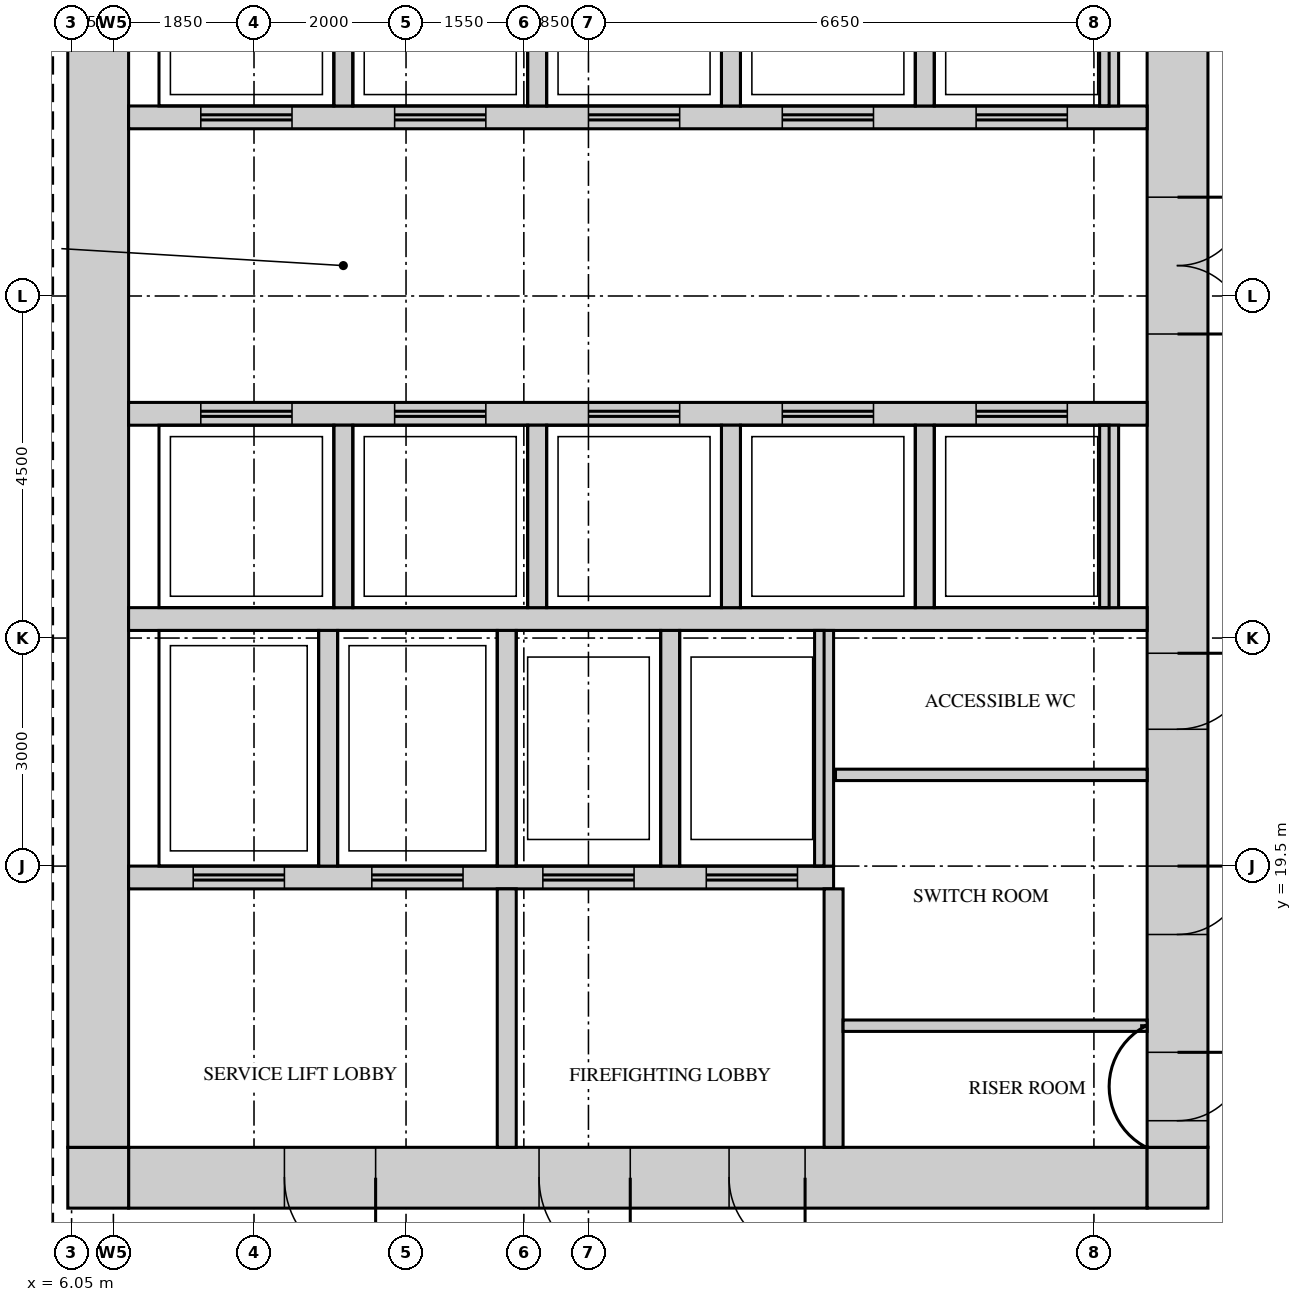
"""IFC4 building model, lengths in metres.
Left out: names, types, materials, properties, quantities, classifications, styles, units other than length and angle.
Written with IfcOpenShell. Run it as: python <this file> out.ifc"""

import sys

from ifc_helpers import new_model, si_unit, direction, frame, frame_2d, origin, place, context, subcontext, project, spatial, rectangle, extrude, source, transform, mapped, element, fill, save


model = new_model("IFC4")
c1 = context("Model", 3, precision=1e-05, world=origin(), true_north=direction((0.0, 1.0)))
c2 = subcontext(c1, "Body", "Model", "MODEL_VIEW")
j1 = project(units=[si_unit("LENGTHUNIT", "METRE"), si_unit("PLANEANGLEUNIT", "RADIAN")], contexts=[c1])
p1 = place(None, origin())
s1 = spatial("IfcSite", under=j1, at=p1, CompositionType="ELEMENT")
p2 = place(p1, origin())
s2 = spatial("IfcBuilding", under=s1, at=p2, CompositionType="ELEMENT")
p3 = place(p2, frame((0.0, 0.0, 200.7)))
s3 = spatial("IfcBuildingStorey", under=s2, at=p3, CompositionType="ELEMENT", Elevation=200.7)
m1 = source(origin(), c2, "Body", "SweptSolid", [
    extrude(rectangle(XDim=13.4, YDim=0.8, at=frame_2d((6.7, 0.0))), origin(), (0.0, 0.0, 1.0), 3.75),
])
p4 = place(p3, frame((6.8, 15.4, 0.0), z_axis=(0.0, 0.0, 1.0), x_axis=(1.0, 0.0, 0.0)))
e1 = element("IfcWall", 1, at=p4, inside=s3, PredefinedType="SHEAR", context=c2, shape_type="MappedRepresentation", body=[
    mapped(m1, transform((0.0, 0.0, 0.0))),
])
m2 = source(origin(), c2, "Body", "SweptSolid", [
    extrude(rectangle(XDim=1.2, YDim=2.1, at=frame_2d((0.6, 1.05))), frame((0.0, 0.41, 0.0), z_axis=(0.0, -1.0, 0.0), x_axis=(1.0, 0.0, 0.0)), (0.0, 0.0, 1.0), 0.82),
])
p5 = place(p4, frame((5.4, 0.0, 0.0)))
e2 = element("IfcOpeningElement", 2, at=p5, cuts=e1, PredefinedType="OPENING", context=c2, shape_type="MappedRepresentation", body=[
    mapped(m2, transform((0.0, 0.0, 0.0))),
])
p6 = place(p4, frame((2.05, 0.0, 0.0)))
e3 = element("IfcOpeningElement", 3, at=p6, cuts=e1, PredefinedType="OPENING", context=c2, shape_type="MappedRepresentation", body=[
    mapped(m2, transform((0.0, 0.0, 0.0))),
])
m3 = source(origin(), c2, "Body", "SweptSolid", [
    extrude(rectangle(XDim=1.0, YDim=2.1, at=frame_2d((0.5, 1.05))), frame((0.0, 0.41, 0.0), z_axis=(0.0, -1.0, 0.0), x_axis=(1.0, 0.0, 0.0)), (0.0, 0.0, 1.0), 0.82),
])
p7 = place(p4, frame((7.9, 0.0, 0.0)))
e4 = element("IfcOpeningElement", 4, at=p7, cuts=e1, PredefinedType="OPENING", context=c2, shape_type="MappedRepresentation", body=[
    mapped(m3, transform((0.0, 0.0, 0.0))),
])
m4 = source(origin(), c2, "Body", "SweptSolid", [
    extrude(rectangle(XDim=0.8, YDim=0.8, at=frame_2d((0.4, 0.0))), origin(), (0.0, 0.0, 1.0), 3.75),
])
for number, where, z_axis, x_axis in (
    (5, (20.2, 15.4, 0.0), (0.0, 0.0, 1.0), (1.0, 0.0, 0.0)),
    (6, (6.0, 15.4, 0.0), (0.0, 0.0, 1.0), (1.0, 0.0, 0.0)),
):
    element("IfcWall", number, at=place(p3, frame(where, z_axis=z_axis, x_axis=x_axis)), inside=s3, PredefinedType="SHEAR", context=c2, shape_type="MappedRepresentation", body=[
        mapped(m4, transform((0.0, 0.0, 0.0))),
    ])
m5 = source(origin(), c2, "Body", "SweptSolid", [
    extrude(rectangle(XDim=22.4, YDim=0.8, at=frame_2d((11.2, 0.0))), origin(), (0.0, 0.0, 1.0), 3.75),
])
p8 = place(p3, frame((20.6, 15.8, 0.0), z_axis=(0.0, 0.0, 1.0), x_axis=(0.0, 1.0, 0.0)))
e7 = element("IfcWall", 7, at=p8, inside=s3, PredefinedType="SHEAR", context=c2, shape_type="MappedRepresentation", body=[
    mapped(m5, transform((0.0, 0.0, 0.0))),
])
m6 = source(origin(), c2, "Body", "SweptSolid", [
    extrude(rectangle(XDim=1.8, YDim=2.1, at=frame_2d((0.9, 1.05))), frame((0.0, 0.41, 0.0), z_axis=(0.0, -1.0, 0.0), x_axis=(1.0, 0.0, 0.0)), (0.0, 0.0, 1.0), 0.82),
])
p9 = place(p8, frame((10.7, 0.0, 0.0)))
e8 = element("IfcOpeningElement", 8, at=p9, cuts=e7, PredefinedType="OPENING", context=c2, shape_type="MappedRepresentation", body=[
    mapped(m6, transform((0.0, 0.0, 0.0))),
])
m7 = source(origin(), c2, "Body", "SweptSolid", [
    extrude(rectangle(XDim=0.9, YDim=2.1, at=frame_2d((0.45, 1.05))), frame((0.0, 0.41, 0.0), z_axis=(0.0, -1.0, 0.0), x_axis=(1.0, 0.0, 0.0)), (0.0, 0.0, 1.0), 0.82),
])
p10 = place(p8, frame((0.35, 0.0, 0.0)))
e9 = element("IfcOpeningElement", 9, at=p10, cuts=e7, PredefinedType="OPENING", context=c2, shape_type="MappedRepresentation", body=[
    mapped(m7, transform((0.0, 0.0, 0.0))),
])
p11 = place(p8, frame((2.8, 0.0, 0.0)))
e10 = element("IfcOpeningElement", 10, at=p11, cuts=e7, PredefinedType="OPENING", context=c2, shape_type="MappedRepresentation", body=[
    mapped(m7, transform((0.0, 0.0, 0.0))),
])
p12 = place(p8, frame((5.5, 0.0, 0.0)))
e11 = element("IfcOpeningElement", 11, at=p12, cuts=e7, PredefinedType="OPENING", context=c2, shape_type="MappedRepresentation", body=[
    mapped(m3, transform((0.0, 0.0, 0.0))),
])
p13 = place(p3, frame((6.4, 15.8, 0.0), z_axis=(0.0, 0.0, 1.0), x_axis=(0.0, 1.0, 0.0)))
e12 = element("IfcWall", 12, at=p13, inside=s3, PredefinedType="SHEAR", context=c2, shape_type="MappedRepresentation", body=[
    mapped(m5, transform((0.0, 0.0, 0.0))),
])
m8 = source(origin(), c2, "Body", "SweptSolid", [
    extrude(rectangle(XDim=13.4, YDim=0.3, at=frame_2d((6.7, 0.0))), origin(), (0.0, 0.0, 1.0), 3.75),
])
p14 = place(p3, frame((6.8, 22.75, 0.0), z_axis=(0.0, 0.0, 1.0), x_axis=(1.0, 0.0, 0.0)))
e13 = element("IfcWall", 13, at=p14, inside=s3, PredefinedType="STANDARD", context=c2, shape_type="MappedRepresentation", body=[
    mapped(m8, transform((0.0, 0.0, 0.0))),
])
m9 = source(origin(), c2, "Body", "SweptSolid", [
    extrude(rectangle(XDim=9.275, YDim=0.3, at=frame_2d((4.637, 0.0))), origin(), (0.0, 0.0, 1.0), 3.75),
])
p15 = place(p3, frame((6.8, 19.35, 0.0), z_axis=(0.0, 0.0, 1.0), x_axis=(1.0, 0.0, 0.0)))
e14 = element("IfcWall", 14, at=p15, inside=s3, PredefinedType="STANDARD", context=c2, shape_type="MappedRepresentation", body=[
    mapped(m9, transform((0.0, 0.0, 0.0))),
])
m10 = source(origin(), c2, "Body", "SweptSolid", [
    extrude(rectangle(XDim=1.2, YDim=2.1, at=frame_2d((0.6, 1.05))), frame((0.0, 0.16, 0.0), z_axis=(0.0, -1.0, 0.0), x_axis=(1.0, 0.0, 0.0)), (0.0, 0.0, 1.0), 0.32),
])
p16 = place(p15, frame((0.85, 0.0, 0.0)))
e15 = element("IfcOpeningElement", 15, at=p16, cuts=e14, PredefinedType="OPENING", context=c2, shape_type="MappedRepresentation", body=[
    mapped(m10, transform((0.0, 0.0, 0.0))),
])
p17 = place(p15, frame((3.2, 0.0, 0.0)))
e16 = element("IfcOpeningElement", 16, at=p17, cuts=e14, PredefinedType="OPENING", context=c2, shape_type="MappedRepresentation", body=[
    mapped(m10, transform((0.0, 0.0, 0.0))),
])
p18 = place(p15, frame((5.45, 0.0, 0.0)))
e17 = element("IfcOpeningElement", 17, at=p18, cuts=e14, PredefinedType="OPENING", context=c2, shape_type="MappedRepresentation", body=[
    mapped(m10, transform((0.0, 0.0, 0.0))),
])
p19 = place(p15, frame((7.6, 0.0, 0.0)))
e18 = element("IfcOpeningElement", 18, at=p19, cuts=e14, PredefinedType="OPENING", context=c2, shape_type="MappedRepresentation", body=[
    mapped(m10, transform((0.0, 0.0, 0.0))),
])
p20 = place(p3, frame((6.8, 29.35, 0.0), z_axis=(0.0, 0.0, 1.0), x_axis=(1.0, 0.0, 0.0)))
e19 = element("IfcWall", 19, at=p20, inside=s3, PredefinedType="STANDARD", context=c2, shape_type="MappedRepresentation", body=[
    mapped(m8, transform((0.0, 0.0, 0.0))),
])
p21 = place(p20, frame((0.95, 0.0, 0.0)))
e20 = element("IfcOpeningElement", 20, at=p21, cuts=e19, PredefinedType="OPENING", context=c2, shape_type="MappedRepresentation", body=[
    mapped(m10, transform((0.0, 0.0, 0.0))),
])
p22 = place(p20, frame((3.5, 0.0, 0.0)))
e21 = element("IfcOpeningElement", 21, at=p22, cuts=e19, PredefinedType="OPENING", context=c2, shape_type="MappedRepresentation", body=[
    mapped(m10, transform((0.0, 0.0, 0.0))),
])
p23 = place(p20, frame((6.05, 0.0, 0.0)))
e22 = element("IfcOpeningElement", 22, at=p23, cuts=e19, PredefinedType="OPENING", context=c2, shape_type="MappedRepresentation", body=[
    mapped(m10, transform((0.0, 0.0, 0.0))),
])
p24 = place(p20, frame((8.6, 0.0, 0.0)))
e23 = element("IfcOpeningElement", 23, at=p24, cuts=e19, PredefinedType="OPENING", context=c2, shape_type="MappedRepresentation", body=[
    mapped(m10, transform((0.0, 0.0, 0.0))),
])
p25 = place(p20, frame((11.15, 0.0, 0.0)))
e24 = element("IfcOpeningElement", 24, at=p25, cuts=e19, PredefinedType="OPENING", context=c2, shape_type="MappedRepresentation", body=[
    mapped(m10, transform((0.0, 0.0, 0.0))),
])
p26 = place(p3, frame((6.8, 25.45, 0.0), z_axis=(0.0, 0.0, 1.0), x_axis=(1.0, 0.0, 0.0)))
e25 = element("IfcWall", 25, at=p26, inside=s3, PredefinedType="STANDARD", context=c2, shape_type="MappedRepresentation", body=[
    mapped(m8, transform((0.0, 0.0, 0.0))),
])
p27 = place(p26, frame((0.95, 0.0, 0.0)))
e26 = element("IfcOpeningElement", 26, at=p27, cuts=e25, PredefinedType="OPENING", context=c2, shape_type="MappedRepresentation", body=[
    mapped(m10, transform((0.0, 0.0, 0.0))),
])
p28 = place(p26, frame((3.5, 0.0, 0.0)))
e27 = element("IfcOpeningElement", 27, at=p28, cuts=e25, PredefinedType="OPENING", context=c2, shape_type="MappedRepresentation", body=[
    mapped(m10, transform((0.0, 0.0, 0.0))),
])
p29 = place(p26, frame((6.05, 0.0, 0.0)))
e28 = element("IfcOpeningElement", 28, at=p29, cuts=e25, PredefinedType="OPENING", context=c2, shape_type="MappedRepresentation", body=[
    mapped(m10, transform((0.0, 0.0, 0.0))),
])
p30 = place(p26, frame((8.6, 0.0, 0.0)))
e29 = element("IfcOpeningElement", 29, at=p30, cuts=e25, PredefinedType="OPENING", context=c2, shape_type="MappedRepresentation", body=[
    mapped(m10, transform((0.0, 0.0, 0.0))),
])
p31 = place(p26, frame((11.15, 0.0, 0.0)))
e30 = element("IfcOpeningElement", 30, at=p31, cuts=e25, PredefinedType="OPENING", context=c2, shape_type="MappedRepresentation", body=[
    mapped(m10, transform((0.0, 0.0, 0.0))),
])
m11 = source(origin(), c2, "Body", "SweptSolid", [
    extrude(rectangle(XDim=3.1, YDim=0.25, at=frame_2d((1.55, 0.0))), origin(), (0.0, 0.0, 1.0), 3.75),
])
for number, where, z_axis, x_axis in (
    (31, (9.425, 19.5, 0.0), (0.0, 0.0, 1.0), (0.0, 1.0, 0.0)),
    (32, (11.775, 19.5, 0.0), (0.0, 0.0, 1.0), (0.0, 1.0, 0.0)),
    (33, (13.925, 19.5, 0.0), (0.0, 0.0, 1.0), (0.0, 1.0, 0.0)),
    (34, (15.95, 19.5, 0.0), (0.0, 0.0, 1.0), (0.0, 1.0, 0.0)),
):
    element("IfcWall", number, at=place(p3, frame(where, z_axis=z_axis, x_axis=x_axis)), inside=s3, PredefinedType="STANDARD", context=c2, shape_type="MappedRepresentation", body=[
        mapped(m11, transform((0.0, 0.0, 0.0))),
    ])
m12 = source(origin(), c2, "Body", "SweptSolid", [
    extrude(rectangle(XDim=2.4, YDim=0.25, at=frame_2d((1.2, 0.0))), origin(), (0.0, 0.0, 1.0), 3.75),
])
for number, where, z_axis, x_axis in (
    (35, (17.275, 29.5, 0.0), (0.0, 0.0, 1.0), (0.0, 1.0, 0.0)),
    (36, (19.7, 29.5, 0.0), (0.0, 0.0, 1.0), (0.0, 1.0, 0.0)),
    (37, (9.625, 29.5, 0.0), (0.0, 0.0, 1.0), (0.0, 1.0, 0.0)),
    (38, (12.175, 29.5, 0.0), (0.0, 0.0, 1.0), (0.0, 1.0, 0.0)),
    (39, (14.725, 29.5, 0.0), (0.0, 0.0, 1.0), (0.0, 1.0, 0.0)),
):
    element("IfcWall", number, at=place(p3, frame(where, z_axis=z_axis, x_axis=x_axis)), inside=s3, PredefinedType="STANDARD", context=c2, shape_type="MappedRepresentation", body=[
        mapped(m12, transform((0.0, 0.0, 0.0))),
    ])
m13 = source(origin(), c2, "Body", "SweptSolid", [
    extrude(rectangle(XDim=2.4, YDim=0.25, at=frame_2d((1.2, 0.0))), origin(), (0.0, 0.0, 1.0), 3.75),
])
for number, where, z_axis, x_axis in (
    (40, (17.275, 22.9, 0.0), (0.0, 0.0, 1.0), (0.0, 1.0, 0.0)),
    (41, (19.7, 22.9, 0.0), (0.0, 0.0, 1.0), (0.0, 1.0, 0.0)),
    (42, (9.625, 22.9, 0.0), (0.0, 0.0, 1.0), (0.0, 1.0, 0.0)),
    (43, (12.175, 22.9, 0.0), (0.0, 0.0, 1.0), (0.0, 1.0, 0.0)),
    (44, (14.725, 22.9, 0.0), (0.0, 0.0, 1.0), (0.0, 1.0, 0.0)),
):
    element("IfcWall", number, at=place(p3, frame(where, z_axis=z_axis, x_axis=x_axis)), inside=s3, PredefinedType="STANDARD", context=c2, shape_type="MappedRepresentation", body=[
        mapped(m13, transform((0.0, 0.0, 0.0))),
    ])
m14 = source(origin(), c2, "Body", "SweptSolid", [
    extrude(rectangle(XDim=3.4, YDim=0.25, at=frame_2d((1.7, 0.0))), origin(), (0.0, 0.0, 1.0), 3.75),
])
for number, where, z_axis, x_axis in (
    (45, (16.075, 15.8, 0.0), (0.0, 0.0, 1.0), (0.0, 1.0, 0.0)),
    (46, (11.775, 15.8, 0.0), (0.0, 0.0, 1.0), (0.0, 1.0, 0.0)),
):
    element("IfcWall", number, at=place(p3, frame(where, z_axis=z_axis, x_axis=x_axis)), inside=s3, PredefinedType="STANDARD", context=c2, shape_type="MappedRepresentation", body=[
        mapped(m14, transform((0.0, 0.0, 0.0))),
    ])
m15 = source(origin(), c2, "Body", "SweptSolid", [
    extrude(rectangle(XDim=4.0, YDim=0.15, at=frame_2d((2.0, 0.0))), origin(), (0.0, 0.0, 1.0), 3.8),
])
p32 = place(p3, frame((16.2, 17.4, 0.0), z_axis=(0.0, 0.0, 1.0), x_axis=(1.0, 0.0, 0.0)))
e47 = element("IfcWall", 47, at=p32, inside=s3, PredefinedType="PARTITIONING", context=c2, shape_type="MappedRepresentation", body=[
    mapped(m15, transform((0.0, 0.0, 0.0))),
])
m16 = source(origin(), c2, "Body", "SweptSolid", [
    extrude(rectangle(XDim=4.1, YDim=0.15, at=frame_2d((2.05, 0.0))), origin(), (0.0, 0.0, 1.0), 3.8),
])
p33 = place(p3, frame((16.1, 20.7, 0.0), z_axis=(0.0, 0.0, 1.0), x_axis=(1.0, 0.0, 0.0)))
e48 = element("IfcWall", 48, at=p33, inside=s3, PredefinedType="PARTITIONING", context=c2, shape_type="MappedRepresentation", body=[
    mapped(m16, transform((0.0, 0.0, 0.0))),
])
m17 = source(origin(), c2, "Body", "SweptSolid", [
    extrude(rectangle(XDim=1.8, YDim=2.1, at=frame_2d((0.9, 1.05))), frame((0.0, 0.35, 0.0), z_axis=(0.0, -1.0, 0.0), x_axis=(1.0, 0.0, 0.0)), (0.0, 0.0, 1.0), 0.7),
])
p34 = place(p9, origin())
e49 = element("IfcDoor", 49, at=p34, inside=s3, OperationType="DOUBLE_DOOR_SINGLE_SWING", PredefinedType="DOOR", context=c2, shape_type="MappedRepresentation", body=[
    mapped(m17, transform((0.0, 0.0, 0.0))),
])
fill(e8, e49)
m18 = source(origin(), c2, "Body", "SweptSolid", [
    extrude(rectangle(XDim=0.9, YDim=2.1, at=frame_2d((0.45, 1.05))), frame((0.0, 0.35, 0.0), z_axis=(0.0, -1.0, 0.0), x_axis=(1.0, 0.0, 0.0)), (0.0, 0.0, 1.0), 0.7),
])
p35 = place(p10, origin())
e50 = element("IfcDoor", 50, at=p35, inside=s3, OperationType="SINGLE_SWING_RIGHT", PredefinedType="DOOR", context=c2, shape_type="MappedRepresentation", body=[
    mapped(m18, transform((0.0, 0.0, 0.0))),
])
fill(e9, e50)
p36 = place(p11, origin())
e51 = element("IfcDoor", 51, at=p36, inside=s3, OperationType="SINGLE_SWING_RIGHT", PredefinedType="DOOR", context=c2, shape_type="MappedRepresentation", body=[
    mapped(m18, transform((0.0, 0.0, 0.0))),
])
fill(e10, e51)
m19 = source(origin(), c2, "Body", "SweptSolid", [
    extrude(rectangle(XDim=1.0, YDim=2.1, at=frame_2d((0.5, 1.05))), frame((0.0, 0.35, 0.0), z_axis=(0.0, -1.0, 0.0), x_axis=(1.0, 0.0, 0.0)), (0.0, 0.0, 1.0), 0.7),
])
p37 = place(p12, origin())
e52 = element("IfcDoor", 52, at=p37, inside=s3, OperationType="SINGLE_SWING_RIGHT", PredefinedType="DOOR", context=c2, shape_type="MappedRepresentation", body=[
    mapped(m19, transform((0.0, 0.0, 0.0))),
])
fill(e11, e52)
m20 = source(origin(), c2, "Body", "SweptSolid", [
    extrude(rectangle(XDim=1.2, YDim=2.1, at=frame_2d((0.6, 1.05))), frame((0.0, 0.35, 0.0), z_axis=(0.0, -1.0, 0.0), x_axis=(1.0, 0.0, 0.0)), (0.0, 0.0, 1.0), 0.7),
])
p38 = place(p5, origin())
e53 = element("IfcDoor", 53, at=p38, inside=s3, OperationType="SINGLE_SWING_RIGHT", PredefinedType="DOOR", context=c2, shape_type="MappedRepresentation", body=[
    mapped(m20, transform((0.0, 0.0, 0.0))),
])
fill(e2, e53)
p39 = place(p6, origin())
e54 = element("IfcDoor", 54, at=p39, inside=s3, OperationType="SINGLE_SWING_RIGHT", PredefinedType="DOOR", context=c2, shape_type="MappedRepresentation", body=[
    mapped(m20, transform((0.0, 0.0, 0.0))),
])
fill(e3, e54)
p40 = place(p7, origin())
e55 = element("IfcDoor", 55, at=p40, inside=s3, OperationType="SINGLE_SWING_RIGHT", PredefinedType="DOOR", context=c2, shape_type="MappedRepresentation", body=[
    mapped(m19, transform((0.0, 0.0, 0.0))),
])
fill(e4, e55)
m21 = source(origin(), c2, "Body", "SweptSolid", [
    extrude(rectangle(XDim=1.2, YDim=2.1, at=frame_2d((0.6, 1.05))), frame((0.0, 0.025, 0.0), z_axis=(0.0, -1.0, 0.0), x_axis=(1.0, 0.0, 0.0)), (0.0, 0.0, 1.0), 0.05),
])
p41 = place(p27, origin())
e56 = element("IfcDoor", 56, at=p41, inside=s3, OperationType="DOUBLE_DOOR_SLIDING", PredefinedType="DOOR", context=c2, shape_type="MappedRepresentation", body=[
    mapped(m21, transform((0.0, 0.0, 0.0))),
])
fill(e26, e56)
p42 = place(p28, origin())
e57 = element("IfcDoor", 57, at=p42, inside=s3, OperationType="DOUBLE_DOOR_SLIDING", PredefinedType="DOOR", context=c2, shape_type="MappedRepresentation", body=[
    mapped(m21, transform((0.0, 0.0, 0.0))),
])
fill(e27, e57)
p43 = place(p29, origin())
e58 = element("IfcDoor", 58, at=p43, inside=s3, OperationType="DOUBLE_DOOR_SLIDING", PredefinedType="DOOR", context=c2, shape_type="MappedRepresentation", body=[
    mapped(m21, transform((0.0, 0.0, 0.0))),
])
fill(e28, e58)
p44 = place(p30, origin())
e59 = element("IfcDoor", 59, at=p44, inside=s3, OperationType="DOUBLE_DOOR_SLIDING", PredefinedType="DOOR", context=c2, shape_type="MappedRepresentation", body=[
    mapped(m21, transform((0.0, 0.0, 0.0))),
])
fill(e29, e59)
p45 = place(p31, origin())
e60 = element("IfcDoor", 60, at=p45, inside=s3, OperationType="DOUBLE_DOOR_SLIDING", PredefinedType="DOOR", context=c2, shape_type="MappedRepresentation", body=[
    mapped(m21, transform((0.0, 0.0, 0.0))),
])
fill(e30, e60)
p46 = place(p21, origin())
e61 = element("IfcDoor", 61, at=p46, inside=s3, OperationType="DOUBLE_DOOR_SLIDING", PredefinedType="DOOR", context=c2, shape_type="MappedRepresentation", body=[
    mapped(m21, transform((0.0, 0.0, 0.0))),
])
fill(e20, e61)
p47 = place(p22, origin())
e62 = element("IfcDoor", 62, at=p47, inside=s3, OperationType="DOUBLE_DOOR_SLIDING", PredefinedType="DOOR", context=c2, shape_type="MappedRepresentation", body=[
    mapped(m21, transform((0.0, 0.0, 0.0))),
])
fill(e21, e62)
p48 = place(p23, origin())
e63 = element("IfcDoor", 63, at=p48, inside=s3, OperationType="DOUBLE_DOOR_SLIDING", PredefinedType="DOOR", context=c2, shape_type="MappedRepresentation", body=[
    mapped(m21, transform((0.0, 0.0, 0.0))),
])
fill(e22, e63)
p49 = place(p24, origin())
e64 = element("IfcDoor", 64, at=p49, inside=s3, OperationType="DOUBLE_DOOR_SLIDING", PredefinedType="DOOR", context=c2, shape_type="MappedRepresentation", body=[
    mapped(m21, transform((0.0, 0.0, 0.0))),
])
fill(e23, e64)
p50 = place(p25, origin())
e65 = element("IfcDoor", 65, at=p50, inside=s3, OperationType="DOUBLE_DOOR_SLIDING", PredefinedType="DOOR", context=c2, shape_type="MappedRepresentation", body=[
    mapped(m21, transform((0.0, 0.0, 0.0))),
])
fill(e24, e65)
p51 = place(p16, origin())
e66 = element("IfcDoor", 66, at=p51, inside=s3, OperationType="DOUBLE_DOOR_SLIDING", PredefinedType="DOOR", context=c2, shape_type="MappedRepresentation", body=[
    mapped(m21, transform((0.0, 0.0, 0.0))),
])
fill(e15, e66)
p52 = place(p17, origin())
e67 = element("IfcDoor", 67, at=p52, inside=s3, OperationType="DOUBLE_DOOR_SLIDING", PredefinedType="DOOR", context=c2, shape_type="MappedRepresentation", body=[
    mapped(m21, transform((0.0, 0.0, 0.0))),
])
fill(e16, e67)
p53 = place(p18, origin())
e68 = element("IfcDoor", 68, at=p53, inside=s3, OperationType="DOUBLE_DOOR_SLIDING", PredefinedType="DOOR", context=c2, shape_type="MappedRepresentation", body=[
    mapped(m21, transform((0.0, 0.0, 0.0))),
])
fill(e17, e68)
p54 = place(p19, origin())
e69 = element("IfcDoor", 69, at=p54, inside=s3, OperationType="DOUBLE_DOOR_SLIDING", PredefinedType="DOOR", context=c2, shape_type="MappedRepresentation", body=[
    mapped(m21, transform((0.0, 0.0, 0.0))),
])
fill(e18, e69)
save(model, sys.argv[1])
